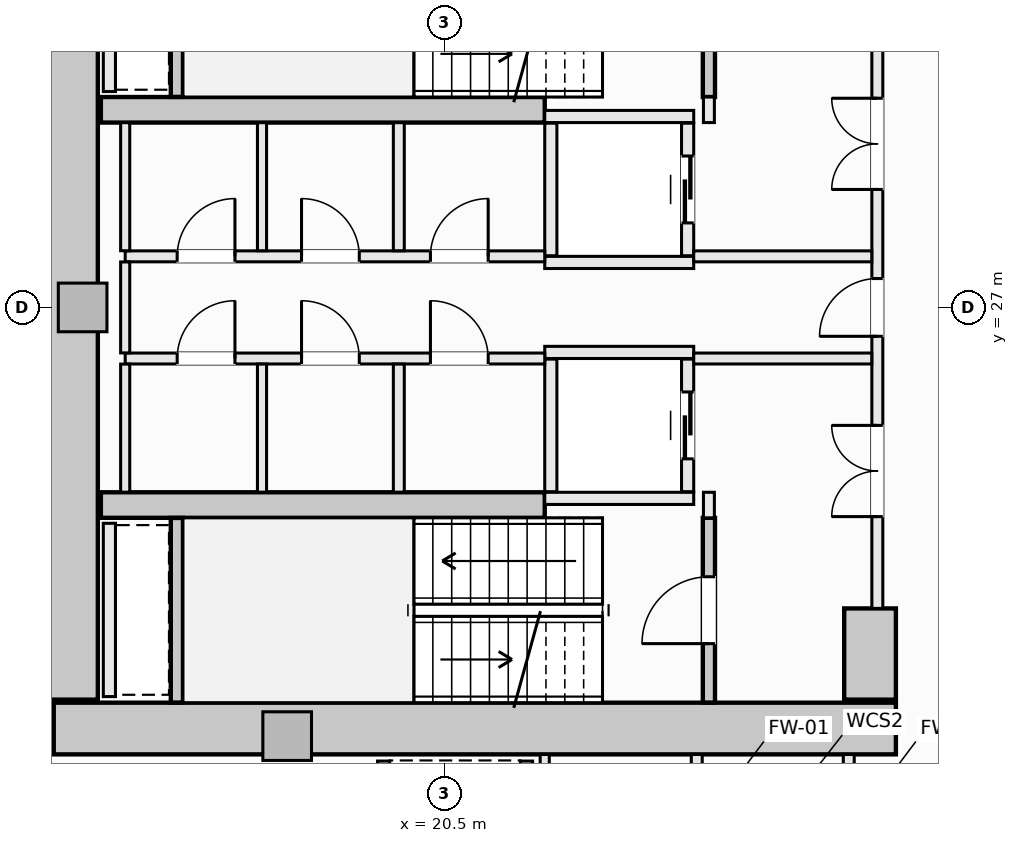
"""IFC4 building model, lengths in metres.
Left out: names, types, materials, properties, quantities, classifications, styles, units other than length and angle.
Written with IfcOpenShell. Run it as: python <this file> out.ifc"""

import sys

from ifc_helpers import new_model, si_unit, direction, frame, frame_2d, origin, origin_2d, place, context, subcontext, project, spatial, rectangle, extrude, element, fill, save


model = new_model("IFC4")
c1 = context("Model", 3, precision=1e-05, world=origin(), true_north=direction((0.0, 1.0)))
c2 = subcontext(c1, "Body", "Model", "MODEL_VIEW")
j1 = project(units=[si_unit("LENGTHUNIT", "METRE"), si_unit("PLANEANGLEUNIT", "RADIAN")], contexts=[c1])
p1 = place(None, origin())
s1 = spatial("IfcSite", under=j1, at=p1, CompositionType="ELEMENT")
p2 = place(p1, origin())
s2 = spatial("IfcBuilding", under=s1, at=p2, CompositionType="ELEMENT")
p3 = place(p2, frame((0.0, 0.0, 49.6)))
s3 = spatial("IfcBuildingStorey", under=s2, at=p3, CompositionType="ELEMENT", Elevation=49.6)
p4 = place(p3, frame((14.075, 20.075, -0.28), z_axis=(0.0, 0.0, 1.0), x_axis=(1.0, 0.0, 0.0)))
e1 = element("IfcWall", 1, at=p4, inside=s3, PredefinedType="SHEAR", context=c2, shape_type="SweptSolid", body=[
    extrude(rectangle(XDim=13.85, YDim=0.85, at=frame_2d((6.925, 0.0))), origin(), (0.0, 0.0, 1.0), 3.85),
])
p5 = place(p3, frame((14.375, 20.55, -0.28), z_axis=(0.0, 0.0, 1.0), x_axis=(0.0, 1.0, 0.0)))
e2 = element("IfcWall", 2, at=p5, inside=s3, PredefinedType="SHEAR", context=c2, shape_type="SweptSolid", body=[
    extrude(rectangle(XDim=12.9, YDim=0.85, at=frame_2d((6.45, 0.0))), origin(), (0.0, 0.0, 1.0), 3.85),
])
p6 = place(p3, frame((27.5, 20.55, -0.28), z_axis=(0.0, 0.0, 1.0), x_axis=(0.0, 1.0, 0.0)))
e3 = element("IfcWall", 3, at=p6, inside=s3, PredefinedType="SHEAR", context=c2, shape_type="SweptSolid", body=[
    extrude(rectangle(XDim=1.5, YDim=0.85, at=frame_2d((0.75, 0.0))), origin(), (0.0, 0.0, 1.0), 3.85),
])
for number, where, z_axis, x_axis in (
    (4, (14.85, 30.25, -0.28), (0.0, 0.0, 1.0), (1.0, 0.0, 0.0)),
    (5, (14.85, 23.75, -0.28), (0.0, 0.0, 1.0), (1.0, 0.0, 0.0)),
):
    element("IfcWall", number, at=place(p3, frame(where, z_axis=z_axis, x_axis=x_axis)), inside=s3, PredefinedType="SHEAR", context=c2, shape_type="SweptSolid", body=[
        extrude(rectangle(XDim=7.3, YDim=0.42, at=frame_2d((3.65, 0.0))), origin(), (0.0, 0.0, 1.0), 3.85),
    ])
for number, where, z_axis, x_axis in (
    (6, (14.55, 27.0, -0.28), (0.0, 0.0, 1.0), (1.0, 0.0, 0.0)),
    (7, (17.914, 19.95, -0.28), (0.0, 0.0, 1.0), (1.0, 0.0, 0.0)),
):
    element("IfcColumn", number, at=place(p3, frame(where, z_axis=z_axis, x_axis=x_axis)), inside=s3, PredefinedType="PILASTER", context=c2, shape_type="SweptSolid", body=[
        extrude(rectangle(XDim=0.8, YDim=0.8, at=origin_2d()), origin(), (0.0, 0.0, 1.0), 3.85),
    ])
p7 = place(p3, frame((24.85, 30.46, -0.28), z_axis=(0.0, 0.0, 1.0), x_axis=(0.0, 1.0, 0.0)))
e8 = element("IfcWall", 8, at=p7, inside=s3, PredefinedType="SHEAR", context=c2, shape_type="SweptSolid", body=[
    extrude(rectangle(XDim=3.038, YDim=0.2, at=frame_2d((1.519, 0.0))), origin(), (0.0, 0.0, 1.0), 3.85),
])
p8 = place(p7, frame((0.969, 0.0, 0.28)))
e9 = element("IfcOpeningElement", 9, at=p8, cuts=e8, PredefinedType="OPENING", context=c2, shape_type="SweptSolid", body=[
    extrude(rectangle(XDim=1.1, YDim=2.15, at=frame_2d((0.55, 1.075))), frame((0.0, 0.11, 0.0), z_axis=(0.0, -1.0, 0.0), x_axis=(1.0, 0.0, 0.0)), (0.0, 0.0, 1.0), 0.22),
])
p9 = place(p3, frame((16.1, 30.462, -0.28), z_axis=(0.0, 0.0, 1.0), x_axis=(0.0, 1.0, 0.0)))
e10 = element("IfcWall", 10, at=p9, inside=s3, PredefinedType="SHEAR", context=c2, shape_type="SweptSolid", body=[
    extrude(rectangle(XDim=3.036, YDim=0.2, at=frame_2d((1.518, 0.0))), origin(), (0.0, 0.0, 1.0), 3.85),
])
p10 = place(p3, frame((24.85, 20.502, -0.28), z_axis=(0.0, 0.0, 1.0), x_axis=(0.0, 1.0, 0.0)))
e11 = element("IfcWall", 11, at=p10, inside=s3, PredefinedType="SHEAR", context=c2, shape_type="SweptSolid", body=[
    extrude(rectangle(XDim=3.038, YDim=0.2, at=frame_2d((1.519, 0.0))), origin(), (0.0, 0.0, 1.0), 3.85),
])
p11 = place(p10, frame((0.969, 0.0, 0.28)))
e12 = element("IfcOpeningElement", 12, at=p11, cuts=e11, PredefinedType="OPENING", context=c2, shape_type="SweptSolid", body=[
    extrude(rectangle(XDim=1.1, YDim=2.15, at=frame_2d((0.55, 1.075))), frame((0.0, 0.11, 0.0), z_axis=(0.0, -1.0, 0.0), x_axis=(1.0, 0.0, 0.0)), (0.0, 0.0, 1.0), 0.22),
])
p12 = place(p3, frame((16.1, 20.502, -0.28), z_axis=(0.0, 0.0, 1.0), x_axis=(0.0, 1.0, 0.0)))
e13 = element("IfcWall", 13, at=p12, inside=s3, PredefinedType="SHEAR", context=c2, shape_type="SweptSolid", body=[
    extrude(rectangle(XDim=3.036, YDim=0.2, at=frame_2d((1.518, 0.0))), origin(), (0.0, 0.0, 1.0), 3.85),
])
for number, where, z_axis, x_axis in (
    (14, (22.15, 30.14, 0.0), (0.0, 0.0, 1.0), (1.0, 0.0, 0.0)),
    (15, (22.15, 27.74, 0.0), (0.0, 0.0, 1.0), (1.0, 0.0, 0.0)),
):
    element("IfcWall", number, at=place(p3, frame(where, z_axis=z_axis, x_axis=x_axis)), inside=s3, PredefinedType="SOLIDWALL", context=c2, shape_type="SweptSolid", body=[
        extrude(rectangle(XDim=2.45, YDim=0.2, at=frame_2d((1.225, 0.0))), origin(), (0.0, 0.0, 1.0), 3.57),
    ])
p13 = place(p3, frame((22.25, 27.85, 0.0), z_axis=(0.0, 0.0, 1.0), x_axis=(0.0, 1.0, 0.0)))
e16 = element("IfcWall", 16, at=p13, inside=s3, PredefinedType="SOLIDWALL", context=c2, shape_type="SweptSolid", body=[
    extrude(rectangle(XDim=2.18, YDim=0.2, at=frame_2d((1.09, 0.0))), origin(), (0.0, 0.0, 1.0), 3.57),
])
p14 = place(p3, frame((24.5, 27.85, 0.0), z_axis=(0.0, 0.0, 1.0), x_axis=(0.0, 1.0, 0.0)))
e17 = element("IfcWall", 17, at=p14, inside=s3, PredefinedType="SOLIDWALL", context=c2, shape_type="SweptSolid", body=[
    extrude(rectangle(XDim=2.18, YDim=0.2, at=frame_2d((1.09, 0.0))), origin(), (0.0, 0.0, 1.0), 3.57),
])
p15 = place(p14, frame((0.54, 0.0, 0.0)))
e18 = element("IfcOpeningElement", 18, at=p15, cuts=e17, PredefinedType="OPENING", context=c2, shape_type="SweptSolid", body=[
    extrude(rectangle(XDim=1.1, YDim=2.2, at=frame_2d((0.55, 1.1))), frame((0.0, 0.11, 0.0), z_axis=(0.0, -1.0, 0.0), x_axis=(1.0, 0.0, 0.0)), (0.0, 0.0, 1.0), 0.22),
])
for number, where, z_axis, x_axis in (
    (19, (22.15, 26.26, 0.0), (0.0, 0.0, 1.0), (1.0, 0.0, 0.0)),
    (20, (22.15, 23.86, 0.0), (0.0, 0.0, 1.0), (1.0, 0.0, 0.0)),
):
    element("IfcWall", number, at=place(p3, frame(where, z_axis=z_axis, x_axis=x_axis)), inside=s3, PredefinedType="SOLIDWALL", context=c2, shape_type="SweptSolid", body=[
        extrude(rectangle(XDim=2.45, YDim=0.2, at=frame_2d((1.225, 0.0))), origin(), (0.0, 0.0, 1.0), 3.57),
    ])
p16 = place(p3, frame((22.25, 23.97, 0.0), z_axis=(0.0, 0.0, 1.0), x_axis=(0.0, 1.0, 0.0)))
e21 = element("IfcWall", 21, at=p16, inside=s3, PredefinedType="SOLIDWALL", context=c2, shape_type="SweptSolid", body=[
    extrude(rectangle(XDim=2.18, YDim=0.2, at=frame_2d((1.09, 0.0))), origin(), (0.0, 0.0, 1.0), 3.57),
])
p17 = place(p3, frame((24.5, 23.97, 0.0), z_axis=(0.0, 0.0, 1.0), x_axis=(0.0, 1.0, 0.0)))
e22 = element("IfcWall", 22, at=p17, inside=s3, PredefinedType="SOLIDWALL", context=c2, shape_type="SweptSolid", body=[
    extrude(rectangle(XDim=2.18, YDim=0.2, at=frame_2d((1.09, 0.0))), origin(), (0.0, 0.0, 1.0), 3.57),
])
p18 = place(p17, frame((0.54, 0.0, 0.0)))
e23 = element("IfcOpeningElement", 23, at=p18, cuts=e22, PredefinedType="OPENING", context=c2, shape_type="SweptSolid", body=[
    extrude(rectangle(XDim=1.1, YDim=2.2, at=frame_2d((0.55, 1.1))), frame((0.0, 0.11, 0.0), z_axis=(0.0, -1.0, 0.0), x_axis=(1.0, 0.0, 0.0)), (0.0, 0.0, 1.0), 0.22),
])
for number, where, z_axis, x_axis in (
    (24, (19.5, 17.01, 0.0), (0.0, 0.0, 1.0), (0.0, 1.0, 0.0)),
    (25, (21.85, 17.01, 0.0), (0.0, 0.0, 1.0), (0.0, 1.0, 0.0)),
):
    element("IfcWall", number, at=place(p3, frame(where, z_axis=z_axis, x_axis=x_axis)), inside=s3, PredefinedType="SOLIDWALL", context=c2, shape_type="SweptSolid", body=[
        extrude(rectangle(XDim=2.53, YDim=0.2, at=frame_2d((1.265, 0.0))), origin(), (0.0, 0.0, 1.0), 3.57),
    ])
for number, where, z_axis, x_axis in (
    (26, (14.99, 30.55, 0.0), (0.0, 0.0, 1.0), (0.0, 1.0, 0.0)),
    (27, (14.99, 20.6, 0.0), (0.0, 0.0, 1.0), (0.0, 1.0, 0.0)),
):
    element("IfcWall", number, at=place(p3, frame(where, z_axis=z_axis, x_axis=x_axis)), inside=s3, PredefinedType="SOLIDWALL", context=c2, shape_type="SweptSolid", body=[
        extrude(rectangle(XDim=2.85, YDim=0.2, at=frame_2d((1.425, 0.0))), origin(), (0.0, 0.0, 1.0), 3.57),
    ])
for number, where, z_axis, x_axis in (
    (28, (24.85, 23.54, 0.0), (0.0, 0.0, 1.0), (0.0, 1.0, 0.0)),
    (29, (24.85, 30.04, 0.0), (0.0, 0.0, 1.0), (0.0, 1.0, 0.0)),
):
    element("IfcWall", number, at=place(p3, frame(where, z_axis=z_axis, x_axis=x_axis)), inside=s3, PredefinedType="SOLIDWALL", context=c2, shape_type="SweptSolid", body=[
        extrude(rectangle(XDim=0.42, YDim=0.18, at=frame_2d((0.21, 0.0))), origin(), (0.0, 0.0, 1.0), 3.57),
    ])
p19 = place(p3, frame((27.62, 22.05, 0.0), z_axis=(0.0, 0.0, 1.0), x_axis=(0.0, 1.0, 0.0)))
e30 = element("IfcWall", 30, at=p19, inside=s3, PredefinedType="SOLIDWALL", context=c2, shape_type="SweptSolid", body=[
    extrude(rectangle(XDim=9.9, YDim=0.18, at=frame_2d((4.95, 0.0))), origin(), (0.0, 0.0, 1.0), 2.662),
])
p20 = place(p19, frame((4.475, 0.0, 0.0)))
e31 = element("IfcOpeningElement", 31, at=p20, cuts=e30, PredefinedType="OPENING", context=c2, shape_type="SweptSolid", body=[
    extrude(rectangle(XDim=0.95, YDim=2.1, at=frame_2d((0.475, 1.05))), frame((0.0, 0.1, 0.0), z_axis=(0.0, -1.0, 0.0), x_axis=(1.0, 0.0, 0.0)), (0.0, 0.0, 1.0), 0.2),
])
p21 = place(p19, frame((6.89, 0.0, 0.0)))
e32 = element("IfcOpeningElement", 32, at=p21, cuts=e30, PredefinedType="OPENING", context=c2, shape_type="SweptSolid", body=[
    extrude(rectangle(XDim=1.5, YDim=2.2, at=frame_2d((0.75, 1.1))), frame((0.0, 0.1, 0.0), z_axis=(0.0, -1.0, 0.0), x_axis=(1.0, 0.0, 0.0)), (0.0, 0.0, 1.0), 0.2),
])
p22 = place(p19, frame((1.51, 0.0, 0.0)))
e33 = element("IfcOpeningElement", 33, at=p22, cuts=e30, PredefinedType="OPENING", context=c2, shape_type="SweptSolid", body=[
    extrude(rectangle(XDim=1.5, YDim=2.2, at=frame_2d((0.75, 1.1))), frame((0.0, 0.1, 0.0), z_axis=(0.0, -1.0, 0.0), x_axis=(1.0, 0.0, 0.0)), (0.0, 0.0, 1.0), 0.2),
])
p23 = place(p3, frame((15.25, 27.84, 0.0), z_axis=(0.0, 0.0, 1.0), x_axis=(1.0, 0.0, 0.0)))
e34 = element("IfcWall", 34, at=p23, inside=s3, PredefinedType="SOLIDWALL", context=c2, shape_type="SweptSolid", body=[
    extrude(rectangle(XDim=6.9, YDim=0.18, at=frame_2d((3.45, 0.0))), origin(), (0.0, 0.0, 1.0), 3.57),
])
p24 = place(p23, frame((5.02, 0.0, 0.0)))
e35 = element("IfcOpeningElement", 35, at=p24, cuts=e34, PredefinedType="OPENING", context=c2, shape_type="SweptSolid", body=[
    extrude(rectangle(XDim=0.95, YDim=2.1, at=frame_2d((0.475, 1.05))), frame((0.0, 0.1, 0.0), z_axis=(0.0, -1.0, 0.0), x_axis=(1.0, 0.0, 0.0)), (0.0, 0.0, 1.0), 0.2),
])
p25 = place(p23, frame((0.855, 0.0, 0.0)))
e36 = element("IfcOpeningElement", 36, at=p25, cuts=e34, PredefinedType="OPENING", context=c2, shape_type="SweptSolid", body=[
    extrude(rectangle(XDim=0.95, YDim=2.1, at=frame_2d((0.475, 1.05))), frame((0.0, 0.1, 0.0), z_axis=(0.0, -1.0, 0.0), x_axis=(1.0, 0.0, 0.0)), (0.0, 0.0, 1.0), 0.2),
])
p26 = place(p23, frame((2.9, 0.0, 0.0)))
e37 = element("IfcOpeningElement", 37, at=p26, cuts=e34, PredefinedType="OPENING", context=c2, shape_type="SweptSolid", body=[
    extrude(rectangle(XDim=0.95, YDim=2.1, at=frame_2d((0.475, 1.05))), frame((0.0, 0.1, 0.0), z_axis=(0.0, -1.0, 0.0), x_axis=(1.0, 0.0, 0.0)), (0.0, 0.0, 1.0), 0.2),
])
p27 = place(p3, frame((24.6, 27.84, 0.0), z_axis=(0.0, 0.0, 1.0), x_axis=(1.0, 0.0, 0.0)))
e38 = element("IfcWall", 38, at=p27, inside=s3, PredefinedType="SOLIDWALL", context=c2, shape_type="SweptSolid", body=[
    extrude(rectangle(XDim=2.928, YDim=0.18, at=frame_2d((1.464, 0.0))), origin(), (0.0, 0.0, 1.0), 3.57),
])
p28 = place(p3, frame((15.25, 26.16, 0.0), z_axis=(0.0, 0.0, 1.0), x_axis=(1.0, 0.0, 0.0)))
e39 = element("IfcWall", 39, at=p28, inside=s3, PredefinedType="SOLIDWALL", context=c2, shape_type="SweptSolid", body=[
    extrude(rectangle(XDim=6.9, YDim=0.18, at=frame_2d((3.45, 0.0))), origin(), (0.0, 0.0, 1.0), 3.57),
])
p29 = place(p28, frame((5.02, 0.0, 0.0)))
e40 = element("IfcOpeningElement", 40, at=p29, cuts=e39, PredefinedType="OPENING", context=c2, shape_type="SweptSolid", body=[
    extrude(rectangle(XDim=0.95, YDim=2.1, at=frame_2d((0.475, 1.05))), frame((0.0, 0.1, 0.0), z_axis=(0.0, -1.0, 0.0), x_axis=(1.0, 0.0, 0.0)), (0.0, 0.0, 1.0), 0.2),
])
p30 = place(p28, frame((0.855, 0.0, 0.0)))
e41 = element("IfcOpeningElement", 41, at=p30, cuts=e39, PredefinedType="OPENING", context=c2, shape_type="SweptSolid", body=[
    extrude(rectangle(XDim=0.95, YDim=2.1, at=frame_2d((0.475, 1.05))), frame((0.0, 0.1, 0.0), z_axis=(0.0, -1.0, 0.0), x_axis=(1.0, 0.0, 0.0)), (0.0, 0.0, 1.0), 0.2),
])
p31 = place(p28, frame((2.9, 0.0, 0.0)))
e42 = element("IfcOpeningElement", 42, at=p31, cuts=e39, PredefinedType="OPENING", context=c2, shape_type="SweptSolid", body=[
    extrude(rectangle(XDim=0.95, YDim=2.1, at=frame_2d((0.475, 1.05))), frame((0.0, 0.1, 0.0), z_axis=(0.0, -1.0, 0.0), x_axis=(1.0, 0.0, 0.0)), (0.0, 0.0, 1.0), 0.2),
])
p32 = place(p3, frame((24.6, 26.16, 0.0), z_axis=(0.0, 0.0, 1.0), x_axis=(1.0, 0.0, 0.0)))
e43 = element("IfcWall", 43, at=p32, inside=s3, PredefinedType="SOLIDWALL", context=c2, shape_type="SweptSolid", body=[
    extrude(rectangle(XDim=2.928, YDim=0.18, at=frame_2d((1.464, 0.0))), origin(), (0.0, 0.0, 1.0), 3.57),
])
p33 = place(p3, frame((15.25, 23.962, 0.0), z_axis=(0.0, 0.0, 1.0), x_axis=(0.0, 1.0, 0.0)))
e44 = element("IfcWall", 44, at=p33, inside=s3, PredefinedType="PARTITIONING", context=c2, shape_type="SweptSolid", body=[
    extrude(rectangle(XDim=2.106, YDim=0.15, at=frame_2d((1.053, 0.0))), origin(), (0.0, 0.0, 1.0), 3.57),
])
p34 = place(p3, frame((15.25, 26.252, 0.0), z_axis=(0.0, 0.0, 1.0), x_axis=(0.0, 1.0, 0.0)))
e45 = element("IfcWall", 45, at=p34, inside=s3, PredefinedType="PARTITIONING", context=c2, shape_type="SweptSolid", body=[
    extrude(rectangle(XDim=1.496, YDim=0.15, at=frame_2d((0.748, 0.0))), origin(), (0.0, 0.0, 1.0), 3.57),
])
p35 = place(p3, frame((15.25, 27.932, 0.0), z_axis=(0.0, 0.0, 1.0), x_axis=(0.0, 1.0, 0.0)))
e46 = element("IfcWall", 46, at=p35, inside=s3, PredefinedType="PARTITIONING", context=c2, shape_type="SweptSolid", body=[
    extrude(rectangle(XDim=2.106, YDim=0.15, at=frame_2d((1.053, 0.0))), origin(), (0.0, 0.0, 1.0), 3.57),
])
for number, where, z_axis, x_axis in (
    (47, (19.75, 23.962, 0.0), (0.0, 0.0, 1.0), (0.0, 1.0, 0.0)),
    (48, (19.75, 27.932, 0.0), (0.0, 0.0, 1.0), (0.0, 1.0, 0.0)),
):
    element("IfcWall", number, at=place(p3, frame(where, z_axis=z_axis, x_axis=x_axis)), inside=s3, PredefinedType="SOLIDWALL", context=c2, shape_type="SweptSolid", body=[
        extrude(rectangle(XDim=2.106, YDim=0.18, at=frame_2d((1.053, 0.0))), origin(), (0.0, 0.0, 1.0), 3.57),
    ])
for number, where, z_axis, x_axis in (
    (49, (17.5, 23.962, 0.0), (0.0, 0.0, 1.0), (0.0, 1.0, 0.0)),
    (50, (17.5, 27.932, 0.0), (0.0, 0.0, 1.0), (0.0, 1.0, 0.0)),
):
    element("IfcWall", number, at=place(p3, frame(where, z_axis=z_axis, x_axis=x_axis)), inside=s3, PredefinedType="PARTITIONING", context=c2, shape_type="SweptSolid", body=[
        extrude(rectangle(XDim=2.106, YDim=0.15, at=frame_2d((1.053, 0.0))), origin(), (0.0, 0.0, 1.0), 3.57),
    ])
p36 = place(p3, frame((22.15, 17.142, 0.0), z_axis=(0.0, 0.0, 1.0), x_axis=(0.0, 1.0, 0.0)))
e51 = element("IfcWall", 51, at=p36, inside=s3, PredefinedType="PARTITIONING", context=c2, shape_type="SweptSolid", body=[
    extrude(rectangle(XDim=2.506, YDim=0.15, at=frame_2d((1.253, 0.0))), origin(), (0.0, 0.0, 1.0), 3.57),
])
p37 = place(p3, frame((24.65, 17.142, 0.0), z_axis=(0.0, 0.0, 1.0), x_axis=(0.0, 1.0, 0.0)))
e52 = element("IfcWall", 52, at=p37, inside=s3, PredefinedType="SOLIDWALL", context=c2, shape_type="SweptSolid", body=[
    extrude(rectangle(XDim=2.506, YDim=0.18, at=frame_2d((1.253, 0.0))), origin(), (0.0, 0.0, 1.0), 3.57),
])
p38 = place(p37, frame((0.778, 0.0, 0.0)))
e53 = element("IfcOpeningElement", 53, at=p38, cuts=e52, PredefinedType="OPENING", context=c2, shape_type="SweptSolid", body=[
    extrude(rectangle(XDim=0.95, YDim=2.1, at=frame_2d((0.475, 1.05))), frame((0.0, 0.1, 0.0), z_axis=(0.0, -1.0, 0.0), x_axis=(1.0, 0.0, 0.0)), (0.0, 0.0, 1.0), 0.2),
])
p39 = place(p3, frame((27.15, 17.142, 0.0), z_axis=(0.0, 0.0, 1.0), x_axis=(0.0, 1.0, 0.0)))
e54 = element("IfcWall", 54, at=p39, inside=s3, PredefinedType="SOLIDWALL", context=c2, shape_type="SweptSolid", body=[
    extrude(rectangle(XDim=2.506, YDim=0.18, at=frame_2d((1.253, 0.0))), origin(), (0.0, 0.0, 1.0), 3.57),
])
p40 = place(p39, frame((0.778, 0.0, 0.0)))
e55 = element("IfcOpeningElement", 55, at=p40, cuts=e54, PredefinedType="OPENING", context=c2, shape_type="SweptSolid", body=[
    extrude(rectangle(XDim=0.95, YDim=2.1, at=frame_2d((0.475, 1.05))), frame((0.0, 0.1, 0.0), z_axis=(0.0, -1.0, 0.0), x_axis=(1.0, 0.0, 0.0)), (0.0, 0.0, 1.0), 0.2),
])
p41 = place(p11, origin())
e56 = element("IfcDoor", 56, at=p41, inside=s3, OperationType="SINGLE_SWING_LEFT", PredefinedType="DOOR", context=c2, shape_type="SweptSolid", body=[
    extrude(rectangle(XDim=1.1, YDim=2.15, at=frame_2d((0.55, 1.075))), frame((0.0, 0.025, 0.0), z_axis=(0.0, -1.0, 0.0), x_axis=(1.0, 0.0, 0.0)), (0.0, 0.0, 1.0), 0.05),
])
fill(e12, e56)
p42 = place(p15, origin())
e57 = element("IfcDoor", 57, at=p42, inside=s3, OperationType="SLIDING_TO_LEFT", PredefinedType="DOOR", context=c2, shape_type="SweptSolid", body=[
    extrude(rectangle(XDim=1.1, YDim=2.2, at=frame_2d((0.55, 1.1))), frame((0.0, 0.025, 0.0), z_axis=(0.0, -1.0, 0.0), x_axis=(1.0, 0.0, 0.0)), (0.0, 0.0, 1.0), 0.05),
])
fill(e18, e57)
p43 = place(p18, origin())
e58 = element("IfcDoor", 58, at=p43, inside=s3, OperationType="SLIDING_TO_LEFT", PredefinedType="DOOR", context=c2, shape_type="SweptSolid", body=[
    extrude(rectangle(XDim=1.1, YDim=2.2, at=frame_2d((0.55, 1.1))), frame((0.0, 0.025, 0.0), z_axis=(0.0, -1.0, 0.0), x_axis=(1.0, 0.0, 0.0)), (0.0, 0.0, 1.0), 0.05),
])
fill(e23, e58)
p44 = place(p20, origin())
e59 = element("IfcDoor", 59, at=p44, inside=s3, OperationType="SINGLE_SWING_LEFT", PredefinedType="DOOR", context=c2, shape_type="SweptSolid", body=[
    extrude(rectangle(XDim=0.95, YDim=2.1, at=frame_2d((0.475, 1.05))), frame((0.0, 0.025, 0.0), z_axis=(0.0, -1.0, 0.0), x_axis=(1.0, 0.0, 0.0)), (0.0, 0.0, 1.0), 0.05),
])
fill(e31, e59)
p45 = place(p21, origin())
e60 = element("IfcDoor", 60, at=p45, inside=s3, OperationType="DOUBLE_DOOR_SINGLE_SWING", PredefinedType="DOOR", context=c2, shape_type="SweptSolid", body=[
    extrude(rectangle(XDim=1.5, YDim=2.2, at=frame_2d((0.75, 1.1))), frame((0.0, 0.025, 0.0), z_axis=(0.0, -1.0, 0.0), x_axis=(1.0, 0.0, 0.0)), (0.0, 0.0, 1.0), 0.05),
])
fill(e32, e60)
p46 = place(p22, origin())
e61 = element("IfcDoor", 61, at=p46, inside=s3, OperationType="DOUBLE_DOOR_SINGLE_SWING", PredefinedType="DOOR", context=c2, shape_type="SweptSolid", body=[
    extrude(rectangle(XDim=1.5, YDim=2.2, at=frame_2d((0.75, 1.1))), frame((0.0, 0.025, 0.0), z_axis=(0.0, -1.0, 0.0), x_axis=(1.0, 0.0, 0.0)), (0.0, 0.0, 1.0), 0.05),
])
fill(e33, e61)
p47 = place(p24, origin())
e62 = element("IfcDoor", 62, at=p47, inside=s3, OperationType="SINGLE_SWING_RIGHT", PredefinedType="DOOR", context=c2, shape_type="SweptSolid", body=[
    extrude(rectangle(XDim=0.95, YDim=2.1, at=frame_2d((0.475, 1.05))), frame((0.0, 0.025, 0.0), z_axis=(0.0, -1.0, 0.0), x_axis=(1.0, 0.0, 0.0)), (0.0, 0.0, 1.0), 0.05),
])
fill(e35, e62)
p48 = place(p29, origin())
e63 = element("IfcDoor", 63, at=p48, inside=s3, OperationType="SINGLE_SWING_LEFT", PredefinedType="DOOR", context=c2, shape_type="SweptSolid", body=[
    extrude(rectangle(XDim=0.95, YDim=2.1, at=frame_2d((0.475, 1.05))), frame((0.0, 0.025, 0.0), z_axis=(0.0, -1.0, 0.0), x_axis=(1.0, 0.0, 0.0)), (0.0, 0.0, 1.0), 0.05),
])
fill(e40, e63)
p49 = place(p25, origin())
e64 = element("IfcDoor", 64, at=p49, inside=s3, OperationType="SINGLE_SWING_RIGHT", PredefinedType="DOOR", context=c2, shape_type="SweptSolid", body=[
    extrude(rectangle(XDim=0.95, YDim=2.1, at=frame_2d((0.475, 1.05))), frame((0.0, 0.025, 0.0), z_axis=(0.0, -1.0, 0.0), x_axis=(1.0, 0.0, 0.0)), (0.0, 0.0, 1.0), 0.05),
])
fill(e36, e64)
p50 = place(p26, origin())
e65 = element("IfcDoor", 65, at=p50, inside=s3, OperationType="SINGLE_SWING_LEFT", PredefinedType="DOOR", context=c2, shape_type="SweptSolid", body=[
    extrude(rectangle(XDim=0.95, YDim=2.1, at=frame_2d((0.475, 1.05))), frame((0.0, 0.025, 0.0), z_axis=(0.0, -1.0, 0.0), x_axis=(1.0, 0.0, 0.0)), (0.0, 0.0, 1.0), 0.05),
])
fill(e37, e65)
p51 = place(p30, origin())
e66 = element("IfcDoor", 66, at=p51, inside=s3, OperationType="SINGLE_SWING_RIGHT", PredefinedType="DOOR", context=c2, shape_type="SweptSolid", body=[
    extrude(rectangle(XDim=0.95, YDim=2.1, at=frame_2d((0.475, 1.05))), frame((0.0, 0.025, 0.0), z_axis=(0.0, -1.0, 0.0), x_axis=(1.0, 0.0, 0.0)), (0.0, 0.0, 1.0), 0.05),
])
fill(e41, e66)
p52 = place(p31, origin())
e67 = element("IfcDoor", 67, at=p52, inside=s3, OperationType="SINGLE_SWING_LEFT", PredefinedType="DOOR", context=c2, shape_type="SweptSolid", body=[
    extrude(rectangle(XDim=0.95, YDim=2.1, at=frame_2d((0.475, 1.05))), frame((0.0, 0.025, 0.0), z_axis=(0.0, -1.0, 0.0), x_axis=(1.0, 0.0, 0.0)), (0.0, 0.0, 1.0), 0.05),
])
fill(e42, e67)
save(model, sys.argv[1])
